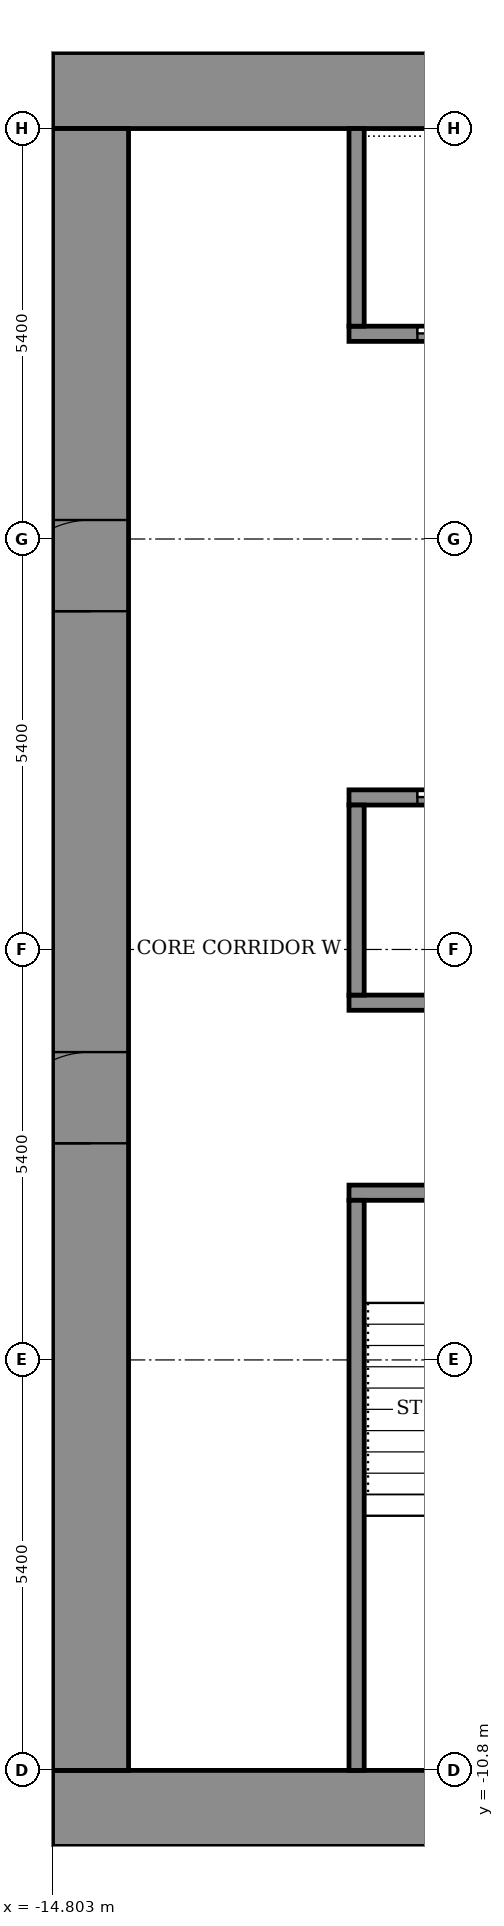
"""IFC4 building model, lengths in metres.
Left out: names, types, materials, properties, quantities, classifications, styles, units other than length and angle.
Written with IfcOpenShell. Run it as: python <this file> out.ifc"""

import sys

from ifc_helpers import new_model, si_unit, direction, frame, frame_2d, origin, place, context, subcontext, project, spatial, rectangle, extrude, element, fill, save


model = new_model("IFC4")
c1 = context("Model", 3, precision=1e-05, world=origin(), true_north=direction((0.0, 1.0)))
c2 = subcontext(c1, "Body", "Model", "MODEL_VIEW")
j1 = project(units=[si_unit("LENGTHUNIT", "METRE"), si_unit("PLANEANGLEUNIT", "RADIAN")], contexts=[c1])
p1 = place(None, origin())
s1 = spatial("IfcSite", under=j1, at=p1, CompositionType="ELEMENT")
p2 = place(p1, origin())
s2 = spatial("IfcBuilding", under=s1, at=p2, CompositionType="ELEMENT")
p3 = place(p2, frame((0.0, 0.0, 93.7)))
s3 = spatial("IfcBuildingStorey", under=s2, at=p3, CompositionType="ELEMENT", Elevation=93.7)
for number, where, z_axis, x_axis in (
    (1, (-14.8, -11.3, 0.0), (0.0, 0.0, 1.0), (1.0, 0.0, 0.0)),
    (2, (-14.8, 11.3, 0.0), (0.0, 0.0, 1.0), (1.0, 0.0, 0.0)),
):
    element("IfcWall", number, at=place(p3, frame(where, z_axis=z_axis, x_axis=x_axis)), inside=s3, PredefinedType="SHEAR", context=c2, shape_type="SweptSolid", body=[
        extrude(rectangle(XDim=29.6, YDim=1.0, at=frame_2d((14.8, 0.0))), origin(), (0.0, 0.0, 1.0), 3.6),
    ])
p4 = place(p3, frame((-14.3, -10.8, 0.0), z_axis=(0.0, 0.0, 1.0), x_axis=(0.0, 1.0, 0.0)))
e3 = element("IfcWall", 3, at=p4, inside=s3, PredefinedType="SHEAR", context=c2, shape_type="SweptSolid", body=[
    extrude(rectangle(XDim=21.6, YDim=1.0, at=frame_2d((10.8, 0.0))), origin(), (0.0, 0.0, 1.0), 3.6),
])
p5 = place(p4, frame((8.25, 0.0, 0.0)))
e4 = element("IfcOpeningElement", 4, at=p5, cuts=e3, PredefinedType="OPENING", context=c2, shape_type="SweptSolid", body=[
    extrude(rectangle(XDim=1.2, YDim=2.1, at=frame_2d((0.6, 1.05))), frame((0.0, 0.51, 0.0), z_axis=(0.0, -1.0, 0.0), x_axis=(1.0, 0.0, 0.0)), (0.0, 0.0, 1.0), 1.02),
])
p6 = place(p4, frame((15.25, 0.0, 0.0)))
e5 = element("IfcOpeningElement", 5, at=p6, cuts=e3, PredefinedType="OPENING", context=c2, shape_type="SweptSolid", body=[
    extrude(rectangle(XDim=1.2, YDim=2.1, at=frame_2d((0.6, 1.05))), frame((0.0, 0.51, 0.0), z_axis=(0.0, -1.0, 0.0), x_axis=(1.0, 0.0, 0.0)), (0.0, 0.0, 1.0), 1.02),
])
p7 = place(p3, frame((-10.9, -3.2, 0.0), z_axis=(0.0, 0.0, 1.0), x_axis=(1.0, 0.0, 0.0)))
e6 = element("IfcWall", 6, at=p7, inside=s3, PredefinedType="SHEAR", context=c2, shape_type="SweptSolid", body=[
    extrude(rectangle(XDim=21.8, YDim=0.2, at=frame_2d((10.9, 0.0))), origin(), (0.0, 0.0, 1.0), 3.05),
])
p8 = place(p7, frame((1.075, 0.0, 0.0)))
e7 = element("IfcOpeningElement", 7, at=p8, cuts=e6, PredefinedType="OPENING", context=c2, shape_type="SweptSolid", body=[
    extrude(rectangle(XDim=1.1, YDim=2.1, at=frame_2d((0.55, 1.05))), frame((0.0, 0.11, 0.0), z_axis=(0.0, -1.0, 0.0), x_axis=(1.0, 0.0, 0.0)), (0.0, 0.0, 1.0), 0.22),
])
p9 = place(p7, frame((10.325, 0.0, 0.0)))
e8 = element("IfcOpeningElement", 8, at=p9, cuts=e6, PredefinedType="OPENING", context=c2, shape_type="SweptSolid", body=[
    extrude(rectangle(XDim=1.1, YDim=2.1, at=frame_2d((0.55, 1.05))), frame((0.0, 0.11, 0.0), z_axis=(0.0, -1.0, 0.0), x_axis=(1.0, 0.0, 0.0)), (0.0, 0.0, 1.0), 0.22),
])
p10 = place(p7, frame((19.625, 0.0, 0.0)))
e9 = element("IfcOpeningElement", 9, at=p10, cuts=e6, PredefinedType="OPENING", context=c2, shape_type="SweptSolid", body=[
    extrude(rectangle(XDim=1.1, YDim=2.1, at=frame_2d((0.55, 1.05))), frame((0.0, 0.11, 0.0), z_axis=(0.0, -1.0, 0.0), x_axis=(1.0, 0.0, 0.0)), (0.0, 0.0, 1.0), 0.22),
])
p11 = place(p7, frame((5.7, 0.0, 0.0)))
e10 = element("IfcOpeningElement", 10, at=p11, cuts=e6, PredefinedType="OPENING", context=c2, shape_type="SweptSolid", body=[
    extrude(rectangle(XDim=1.1, YDim=2.1, at=frame_2d((0.55, 1.05))), frame((0.0, 0.11, 0.0), z_axis=(0.0, -1.0, 0.0), x_axis=(1.0, 0.0, 0.0)), (0.0, 0.0, 1.0), 0.22),
])
p12 = place(p7, frame((14.975, 0.0, 0.0)))
e11 = element("IfcOpeningElement", 11, at=p12, cuts=e6, PredefinedType="OPENING", context=c2, shape_type="SweptSolid", body=[
    extrude(rectangle(XDim=1.1, YDim=2.1, at=frame_2d((0.55, 1.05))), frame((0.0, 0.11, 0.0), z_axis=(0.0, -1.0, 0.0), x_axis=(1.0, 0.0, 0.0)), (0.0, 0.0, 1.0), 0.22),
])
p13 = place(p3, frame((-10.9, -0.7, 0.0), z_axis=(0.0, 0.0, 1.0), x_axis=(1.0, 0.0, 0.0)))
e12 = element("IfcWall", 12, at=p13, inside=s3, PredefinedType="SHEAR", context=c2, shape_type="SweptSolid", body=[
    extrude(rectangle(XDim=21.8, YDim=0.2, at=frame_2d((10.9, 0.0))), origin(), (0.0, 0.0, 1.0), 3.05),
])
p14 = place(p3, frame((-10.9, 2.0, 0.0), z_axis=(0.0, 0.0, 1.0), x_axis=(1.0, 0.0, 0.0)))
e13 = element("IfcWall", 13, at=p14, inside=s3, PredefinedType="SHEAR", context=c2, shape_type="SweptSolid", body=[
    extrude(rectangle(XDim=21.8, YDim=0.2, at=frame_2d((10.9, 0.0))), origin(), (0.0, 0.0, 1.0), 3.05),
])
p15 = place(p14, frame((0.9, 0.0, 0.0)))
e14 = element("IfcOpeningElement", 14, at=p15, cuts=e13, PredefinedType="OPENING", context=c2, shape_type="SweptSolid", body=[
    extrude(rectangle(XDim=1.1, YDim=2.1, at=frame_2d((0.55, 1.05))), frame((0.0, 0.11, 0.0), z_axis=(0.0, -1.0, 0.0), x_axis=(1.0, 0.0, 0.0)), (0.0, 0.0, 1.0), 0.22),
])
p16 = place(p14, frame((3.6, 0.0, 0.0)))
e15 = element("IfcOpeningElement", 15, at=p16, cuts=e13, PredefinedType="OPENING", context=c2, shape_type="SweptSolid", body=[
    extrude(rectangle(XDim=1.1, YDim=2.1, at=frame_2d((0.55, 1.05))), frame((0.0, 0.11, 0.0), z_axis=(0.0, -1.0, 0.0), x_axis=(1.0, 0.0, 0.0)), (0.0, 0.0, 1.0), 0.22),
])
p17 = place(p14, frame((6.3, 0.0, 0.0)))
e16 = element("IfcOpeningElement", 16, at=p17, cuts=e13, PredefinedType="OPENING", context=c2, shape_type="SweptSolid", body=[
    extrude(rectangle(XDim=1.1, YDim=2.1, at=frame_2d((0.55, 1.05))), frame((0.0, 0.11, 0.0), z_axis=(0.0, -1.0, 0.0), x_axis=(1.0, 0.0, 0.0)), (0.0, 0.0, 1.0), 0.22),
])
p18 = place(p14, frame((9.0, 0.0, 0.0)))
e17 = element("IfcOpeningElement", 17, at=p18, cuts=e13, PredefinedType="OPENING", context=c2, shape_type="SweptSolid", body=[
    extrude(rectangle(XDim=1.1, YDim=2.1, at=frame_2d((0.55, 1.05))), frame((0.0, 0.11, 0.0), z_axis=(0.0, -1.0, 0.0), x_axis=(1.0, 0.0, 0.0)), (0.0, 0.0, 1.0), 0.22),
])
p19 = place(p14, frame((11.7, 0.0, 0.0)))
e18 = element("IfcOpeningElement", 18, at=p19, cuts=e13, PredefinedType="OPENING", context=c2, shape_type="SweptSolid", body=[
    extrude(rectangle(XDim=1.1, YDim=2.1, at=frame_2d((0.55, 1.05))), frame((0.0, 0.11, 0.0), z_axis=(0.0, -1.0, 0.0), x_axis=(1.0, 0.0, 0.0)), (0.0, 0.0, 1.0), 0.22),
])
p20 = place(p14, frame((15.175, 0.0, 0.0)))
e19 = element("IfcOpeningElement", 19, at=p20, cuts=e13, PredefinedType="OPENING", context=c2, shape_type="SweptSolid", body=[
    extrude(rectangle(XDim=0.9, YDim=2.1, at=frame_2d((0.45, 1.05))), frame((0.0, 0.11, 0.0), z_axis=(0.0, -1.0, 0.0), x_axis=(1.0, 0.0, 0.0)), (0.0, 0.0, 1.0), 0.22),
])
p21 = place(p14, frame((19.225, 0.0, 0.0)))
e20 = element("IfcOpeningElement", 20, at=p21, cuts=e13, PredefinedType="OPENING", context=c2, shape_type="SweptSolid", body=[
    extrude(rectangle(XDim=0.9, YDim=2.1, at=frame_2d((0.45, 1.05))), frame((0.0, 0.11, 0.0), z_axis=(0.0, -1.0, 0.0), x_axis=(1.0, 0.0, 0.0)), (0.0, 0.0, 1.0), 0.22),
])
p22 = place(p3, frame((-10.9, 8.1, 0.0), z_axis=(0.0, 0.0, 1.0), x_axis=(1.0, 0.0, 0.0)))
e21 = element("IfcWall", 21, at=p22, inside=s3, PredefinedType="SHEAR", context=c2, shape_type="SweptSolid", body=[
    extrude(rectangle(XDim=21.8, YDim=0.2, at=frame_2d((10.9, 0.0))), origin(), (0.0, 0.0, 1.0), 3.05),
])
p23 = place(p22, frame((0.9, 0.0, 0.0)))
e22 = element("IfcOpeningElement", 22, at=p23, cuts=e21, PredefinedType="OPENING", context=c2, shape_type="SweptSolid", body=[
    extrude(rectangle(XDim=1.1, YDim=2.1, at=frame_2d((0.55, 1.05))), frame((0.0, 0.11, 0.0), z_axis=(0.0, -1.0, 0.0), x_axis=(1.0, 0.0, 0.0)), (0.0, 0.0, 1.0), 0.22),
])
p24 = place(p22, frame((3.6, 0.0, 0.0)))
e23 = element("IfcOpeningElement", 23, at=p24, cuts=e21, PredefinedType="OPENING", context=c2, shape_type="SweptSolid", body=[
    extrude(rectangle(XDim=1.1, YDim=2.1, at=frame_2d((0.55, 1.05))), frame((0.0, 0.11, 0.0), z_axis=(0.0, -1.0, 0.0), x_axis=(1.0, 0.0, 0.0)), (0.0, 0.0, 1.0), 0.22),
])
p25 = place(p22, frame((6.3, 0.0, 0.0)))
e24 = element("IfcOpeningElement", 24, at=p25, cuts=e21, PredefinedType="OPENING", context=c2, shape_type="SweptSolid", body=[
    extrude(rectangle(XDim=1.1, YDim=2.1, at=frame_2d((0.55, 1.05))), frame((0.0, 0.11, 0.0), z_axis=(0.0, -1.0, 0.0), x_axis=(1.0, 0.0, 0.0)), (0.0, 0.0, 1.0), 0.22),
])
p26 = place(p22, frame((9.0, 0.0, 0.0)))
e25 = element("IfcOpeningElement", 25, at=p26, cuts=e21, PredefinedType="OPENING", context=c2, shape_type="SweptSolid", body=[
    extrude(rectangle(XDim=1.1, YDim=2.1, at=frame_2d((0.55, 1.05))), frame((0.0, 0.11, 0.0), z_axis=(0.0, -1.0, 0.0), x_axis=(1.0, 0.0, 0.0)), (0.0, 0.0, 1.0), 0.22),
])
p27 = place(p22, frame((11.7, 0.0, 0.0)))
e26 = element("IfcOpeningElement", 26, at=p27, cuts=e21, PredefinedType="OPENING", context=c2, shape_type="SweptSolid", body=[
    extrude(rectangle(XDim=1.1, YDim=2.1, at=frame_2d((0.55, 1.05))), frame((0.0, 0.11, 0.0), z_axis=(0.0, -1.0, 0.0), x_axis=(1.0, 0.0, 0.0)), (0.0, 0.0, 1.0), 0.22),
])
p28 = place(p22, frame((15.175, 0.0, 0.0)))
e27 = element("IfcOpeningElement", 27, at=p28, cuts=e21, PredefinedType="OPENING", context=c2, shape_type="SweptSolid", body=[
    extrude(rectangle(XDim=0.9, YDim=2.1, at=frame_2d((0.45, 1.05))), frame((0.0, 0.11, 0.0), z_axis=(0.0, -1.0, 0.0), x_axis=(1.0, 0.0, 0.0)), (0.0, 0.0, 1.0), 0.22),
])
p29 = place(p22, frame((19.225, 0.0, 0.0)))
e28 = element("IfcOpeningElement", 28, at=p29, cuts=e21, PredefinedType="OPENING", context=c2, shape_type="SweptSolid", body=[
    extrude(rectangle(XDim=0.9, YDim=2.1, at=frame_2d((0.45, 1.05))), frame((0.0, 0.11, 0.0), z_axis=(0.0, -1.0, 0.0), x_axis=(1.0, 0.0, 0.0)), (0.0, 0.0, 1.0), 0.22),
])
p30 = place(p3, frame((-10.8, -10.8, 0.0), z_axis=(0.0, 0.0, 1.0), x_axis=(0.0, 1.0, 0.0)))
e29 = element("IfcWall", 29, at=p30, inside=s3, PredefinedType="SHEAR", context=c2, shape_type="SweptSolid", body=[
    extrude(rectangle(XDim=7.5, YDim=0.2, at=frame_2d((3.75, 0.0))), origin(), (0.0, 0.0, 1.0), 3.05),
])
p31 = place(p3, frame((-10.8, -0.6, 0.0), z_axis=(0.0, 0.0, 1.0), x_axis=(0.0, 1.0, 0.0)))
e30 = element("IfcWall", 30, at=p31, inside=s3, PredefinedType="SHEAR", context=c2, shape_type="SweptSolid", body=[
    extrude(rectangle(XDim=2.5, YDim=0.2, at=frame_2d((1.25, 0.0))), origin(), (0.0, 0.0, 1.0), 3.05),
])
p32 = place(p3, frame((-10.8, 8.2, 0.0), z_axis=(0.0, 0.0, 1.0), x_axis=(0.0, 1.0, 0.0)))
e31 = element("IfcWall", 31, at=p32, inside=s3, PredefinedType="SHEAR", context=c2, shape_type="SweptSolid", body=[
    extrude(rectangle(XDim=2.6, YDim=0.2, at=frame_2d((1.3, 0.0))), origin(), (0.0, 0.0, 1.0), 3.05),
])
p33 = place(p5, origin())
e32 = element("IfcDoor", 32, at=p33, inside=s3, OperationType="DOUBLE_DOOR_SINGLE_SWING", PredefinedType="DOOR", context=c2, shape_type="SweptSolid", body=[
    extrude(rectangle(XDim=1.2, YDim=2.1, at=frame_2d((0.6, 1.05))), frame((0.0, 0.025, 0.0), z_axis=(0.0, -1.0, 0.0), x_axis=(1.0, 0.0, 0.0)), (0.0, 0.0, 1.0), 0.05),
])
fill(e4, e32)
p34 = place(p6, origin())
e33 = element("IfcDoor", 33, at=p34, inside=s3, OperationType="DOUBLE_DOOR_SINGLE_SWING", PredefinedType="DOOR", context=c2, shape_type="SweptSolid", body=[
    extrude(rectangle(XDim=1.2, YDim=2.1, at=frame_2d((0.6, 1.05))), frame((0.0, 0.025, 0.0), z_axis=(0.0, -1.0, 0.0), x_axis=(1.0, 0.0, 0.0)), (0.0, 0.0, 1.0), 0.05),
])
fill(e5, e33)
p35 = place(p15, origin())
e34 = element("IfcDoor", 34, at=p35, inside=s3, OperationType="SLIDING_TO_LEFT", PredefinedType="DOOR", context=c2, shape_type="SweptSolid", body=[
    extrude(rectangle(XDim=1.1, YDim=2.1, at=frame_2d((0.55, 1.05))), frame((0.0, 0.025, 0.0), z_axis=(0.0, -1.0, 0.0), x_axis=(1.0, 0.0, 0.0)), (0.0, 0.0, 1.0), 0.05),
])
fill(e14, e34)
p36 = place(p23, origin())
e35 = element("IfcDoor", 35, at=p36, inside=s3, OperationType="SLIDING_TO_LEFT", PredefinedType="DOOR", context=c2, shape_type="SweptSolid", body=[
    extrude(rectangle(XDim=1.1, YDim=2.1, at=frame_2d((0.55, 1.05))), frame((0.0, 0.025, 0.0), z_axis=(0.0, -1.0, 0.0), x_axis=(1.0, 0.0, 0.0)), (0.0, 0.0, 1.0), 0.05),
])
fill(e22, e35)
save(model, sys.argv[1])
